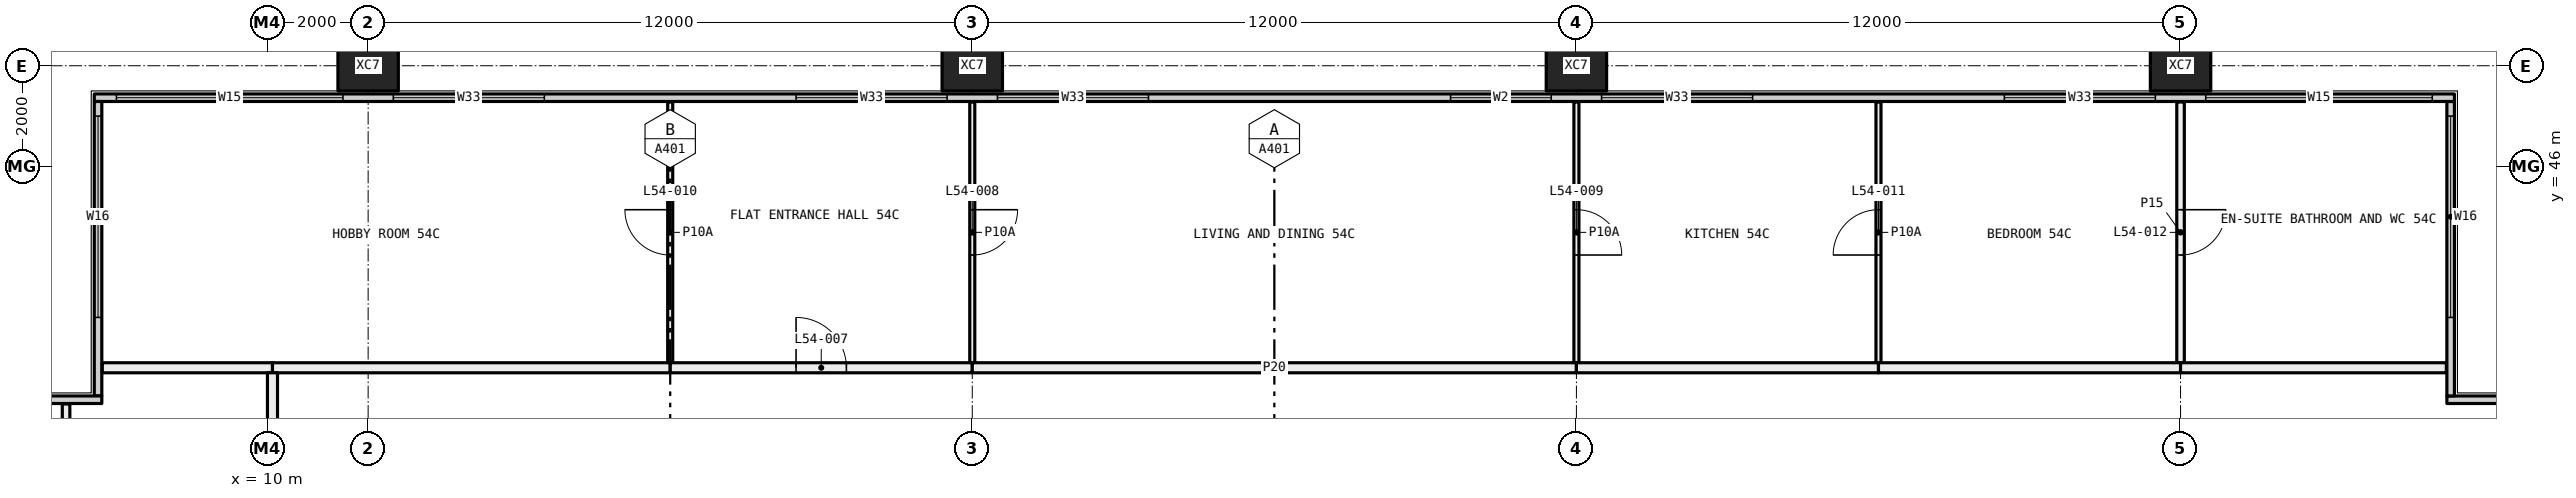
"""IFC4 building model, lengths in metres.
Left out: names, types, materials, properties, quantities, classifications, styles, units other than length and angle.
Written with IfcOpenShell. Run it as: python <this file> out.ifc"""

import sys

from ifc_helpers import new_model, si_unit, direction, frame, frame_2d, origin, origin_2d, place, context, subcontext, project, spatial, rectangle, hollow_rectangle, extrude, element, fill, save


model = new_model("IFC4")
c1 = context("Model", 3, precision=1e-05, world=origin(), true_north=direction((0.0, 1.0)))
c2 = subcontext(c1, "Body", "Model", "MODEL_VIEW")
j1 = project(units=[si_unit("LENGTHUNIT", "METRE"), si_unit("PLANEANGLEUNIT", "RADIAN")], contexts=[c1])
p1 = place(None, origin())
s1 = spatial("IfcSite", under=j1, at=p1, CompositionType="ELEMENT")
p2 = place(p1, origin())
s2 = spatial("IfcBuilding", under=s1, at=p2, CompositionType="ELEMENT")
p3 = place(p2, frame((0.0, 0.0, 203.1)))
s3 = spatial("IfcBuildingStorey", under=s2, at=p3, CompositionType="ELEMENT", Elevation=203.1)
for number, where, z_axis, x_axis in (
    (1, (12.0, 48.0, -0.4), (0.0, 0.0, 1.0), (1.0, 0.0, 0.0)),
    (2, (24.0, 48.0, -0.4), (0.0, 0.0, 1.0), (1.0, 0.0, 0.0)),
    (3, (36.0, 48.0, -0.4), (0.0, 0.0, 1.0), (1.0, 0.0, 0.0)),
    (4, (48.0, 48.0, -0.4), (0.0, 0.0, 1.0), (1.0, 0.0, 0.0)),
):
    element("IfcColumn", number, at=place(p3, frame(where, z_axis=z_axis, x_axis=x_axis)), inside=s3, PredefinedType="COLUMN", context=c2, shape_type="SweptSolid", body=[
        extrude(hollow_rectangle(XDim=1.2, YDim=1.0, WallThickness=0.045, at=origin_2d()), origin(), (0.0, 0.0, 1.0), 3.45),
    ])
p4 = place(p3, frame((53.29, 41.365, 0.0), z_axis=(0.0, 0.0, 1.0), x_axis=(1.0, 0.0, 0.0)))
e5 = element("IfcWall", 5, at=p4, inside=s3, PredefinedType="ELEMENTEDWALL", context=c2, shape_type="SweptSolid", body=[
    extrude(rectangle(XDim=6.15, YDim=0.15, at=frame_2d((3.075, 0.0))), origin(), (0.0, 0.0, 1.0), 3.05),
])
p5 = place(p4, frame((1.71, 0.0, 0.45)))
e6 = element("IfcOpeningElement", 6, at=p5, cuts=e5, PredefinedType="OPENING", context=c2, shape_type="SweptSolid", body=[
    extrude(rectangle(XDim=4.0, YDim=2.55, at=frame_2d((2.0, 1.275))), frame((0.0, 0.085, 0.0), z_axis=(0.0, -1.0, 0.0), x_axis=(1.0, 0.0, 0.0)), (0.0, 0.0, 1.0), 0.17),
])
p6 = place(p3, frame((53.365, 41.44, 0.0), z_axis=(0.0, 0.0, 1.0), x_axis=(0.0, 1.0, 0.0)))
e7 = element("IfcWall", 7, at=p6, inside=s3, PredefinedType="ELEMENTEDWALL", context=c2, shape_type="SweptSolid", body=[
    extrude(rectangle(XDim=5.85, YDim=0.15, at=frame_2d((2.925, 0.0))), origin(), (0.0, 0.0, 1.0), 3.05),
])
p7 = place(p6, frame((1.56, 0.0, 0.45)))
e8 = element("IfcOpeningElement", 8, at=p7, cuts=e7, PredefinedType="OPENING", context=c2, shape_type="SweptSolid", body=[
    extrude(rectangle(XDim=4.0, YDim=2.55, at=frame_2d((2.0, 1.275))), frame((0.0, 0.085, 0.0), z_axis=(0.0, -1.0, 0.0), x_axis=(1.0, 0.0, 0.0)), (0.0, 0.0, 1.0), 0.17),
])
p8 = place(p3, frame((6.56, 47.365, 0.0), z_axis=(0.0, 0.0, 1.0), x_axis=(1.0, 0.0, 0.0)))
e9 = element("IfcWall", 9, at=p8, inside=s3, PredefinedType="ELEMENTEDWALL", context=c2, shape_type="SweptSolid", body=[
    extrude(rectangle(XDim=46.88, YDim=0.15, at=frame_2d((23.44, 0.0))), origin(), (0.0, 0.0, 1.0), 3.05),
])
p9 = place(p8, frame((0.44, 0.0, 0.45)))
e10 = element("IfcOpeningElement", 10, at=p9, cuts=e9, PredefinedType="OPENING", context=c2, shape_type="SweptSolid", body=[
    extrude(rectangle(XDim=4.5, YDim=2.55, at=frame_2d((2.25, 1.275))), frame((0.0, 0.085, 0.0), z_axis=(0.0, -1.0, 0.0), x_axis=(1.0, 0.0, 0.0)), (0.0, 0.0, 1.0), 0.17),
])
p10 = place(p8, frame((5.94, 0.0, 0.45)))
e11 = element("IfcOpeningElement", 11, at=p10, cuts=e9, PredefinedType="OPENING", context=c2, shape_type="SweptSolid", body=[
    extrude(rectangle(XDim=3.0, YDim=2.55, at=frame_2d((1.5, 1.275))), frame((0.0, 0.085, 0.0), z_axis=(0.0, -1.0, 0.0), x_axis=(1.0, 0.0, 0.0)), (0.0, 0.0, 1.0), 0.17),
])
p11 = place(p8, frame((13.94, 0.0, 0.45)))
e12 = element("IfcOpeningElement", 12, at=p11, cuts=e9, PredefinedType="OPENING", context=c2, shape_type="SweptSolid", body=[
    extrude(rectangle(XDim=3.0, YDim=2.55, at=frame_2d((1.5, 1.275))), frame((0.0, 0.085, 0.0), z_axis=(0.0, -1.0, 0.0), x_axis=(1.0, 0.0, 0.0)), (0.0, 0.0, 1.0), 0.17),
])
p12 = place(p8, frame((17.94, 0.0, 0.45)))
e13 = element("IfcOpeningElement", 13, at=p12, cuts=e9, PredefinedType="OPENING", context=c2, shape_type="SweptSolid", body=[
    extrude(rectangle(XDim=3.0, YDim=2.55, at=frame_2d((1.5, 1.275))), frame((0.0, 0.085, 0.0), z_axis=(0.0, -1.0, 0.0), x_axis=(1.0, 0.0, 0.0)), (0.0, 0.0, 1.0), 0.17),
])
p13 = place(p8, frame((26.94, 0.0, 0.45)))
e14 = element("IfcOpeningElement", 14, at=p13, cuts=e9, PredefinedType="OPENING", context=c2, shape_type="SweptSolid", body=[
    extrude(rectangle(XDim=2.0, YDim=2.55, at=frame_2d((1.0, 1.275))), frame((0.0, 0.085, 0.0), z_axis=(0.0, -1.0, 0.0), x_axis=(1.0, 0.0, 0.0)), (0.0, 0.0, 1.0), 0.17),
])
p14 = place(p8, frame((29.94, 0.0, 0.45)))
e15 = element("IfcOpeningElement", 15, at=p14, cuts=e9, PredefinedType="OPENING", context=c2, shape_type="SweptSolid", body=[
    extrude(rectangle(XDim=3.0, YDim=2.55, at=frame_2d((1.5, 1.275))), frame((0.0, 0.085, 0.0), z_axis=(0.0, -1.0, 0.0), x_axis=(1.0, 0.0, 0.0)), (0.0, 0.0, 1.0), 0.17),
])
p15 = place(p8, frame((37.94, 0.0, 0.45)))
e16 = element("IfcOpeningElement", 16, at=p15, cuts=e9, PredefinedType="OPENING", context=c2, shape_type="SweptSolid", body=[
    extrude(rectangle(XDim=3.0, YDim=2.55, at=frame_2d((1.5, 1.275))), frame((0.0, 0.085, 0.0), z_axis=(0.0, -1.0, 0.0), x_axis=(1.0, 0.0, 0.0)), (0.0, 0.0, 1.0), 0.17),
])
p16 = place(p8, frame((41.94, 0.0, 0.45)))
e17 = element("IfcOpeningElement", 17, at=p16, cuts=e9, PredefinedType="OPENING", context=c2, shape_type="SweptSolid", body=[
    extrude(rectangle(XDim=4.5, YDim=2.55, at=frame_2d((2.25, 1.275))), frame((0.0, 0.085, 0.0), z_axis=(0.0, -1.0, 0.0), x_axis=(1.0, 0.0, 0.0)), (0.0, 0.0, 1.0), 0.17),
])
p17 = place(p3, frame((6.635, 41.44, 0.0), z_axis=(0.0, 0.0, 1.0), x_axis=(0.0, 1.0, 0.0)))
e18 = element("IfcWall", 18, at=p17, inside=s3, PredefinedType="ELEMENTEDWALL", context=c2, shape_type="SweptSolid", body=[
    extrude(rectangle(XDim=5.85, YDim=0.15, at=frame_2d((2.925, 0.0))), origin(), (0.0, 0.0, 1.0), 3.05),
])
p18 = place(p17, frame((1.56, 0.0, 0.45)))
e19 = element("IfcOpeningElement", 19, at=p18, cuts=e18, PredefinedType="OPENING", context=c2, shape_type="SweptSolid", body=[
    extrude(rectangle(XDim=4.0, YDim=2.55, at=frame_2d((2.0, 1.275))), frame((0.0, 0.085, 0.0), z_axis=(0.0, -1.0, 0.0), x_axis=(1.0, 0.0, 0.0)), (0.0, 0.0, 1.0), 0.17),
])
p19 = place(p3, frame((0.56, 41.365, 0.0), z_axis=(0.0, 0.0, 1.0), x_axis=(1.0, 0.0, 0.0)))
e20 = element("IfcWall", 20, at=p19, inside=s3, PredefinedType="ELEMENTEDWALL", context=c2, shape_type="SweptSolid", body=[
    extrude(rectangle(XDim=6.15, YDim=0.15, at=frame_2d((3.075, 0.0))), origin(), (0.0, 0.0, 1.0), 3.05),
])
p20 = place(p19, frame((0.44, 0.0, 0.45)))
e21 = element("IfcOpeningElement", 21, at=p20, cuts=e20, PredefinedType="OPENING", context=c2, shape_type="SweptSolid", body=[
    extrude(rectangle(XDim=4.0, YDim=2.55, at=frame_2d((2.0, 1.275))), frame((0.0, 0.085, 0.0), z_axis=(0.0, -1.0, 0.0), x_axis=(1.0, 0.0, 0.0)), (0.0, 0.0, 1.0), 0.17),
])
p21 = place(p3, frame((18.0, 42.1, 0.0), z_axis=(0.0, 0.0, 1.0), x_axis=(0.0, 1.0, 0.0)))
e22 = element("IfcWall", 22, at=p21, inside=s3, PredefinedType="PARTITIONING", context=c2, shape_type="SweptSolid", body=[
    extrude(rectangle(XDim=5.18, YDim=0.1, at=frame_2d((2.59, 0.0))), origin(), (0.0, 0.0, 1.0), 3.05),
])
p22 = place(p21, frame((2.14, 0.0, 0.0)))
e23 = element("IfcOpeningElement", 23, at=p22, cuts=e22, PredefinedType="OPENING", context=c2, shape_type="SweptSolid", body=[
    extrude(rectangle(XDim=0.9, YDim=2.1, at=frame_2d((0.45, 1.05))), frame((0.0, 0.06, 0.0), z_axis=(0.0, -1.0, 0.0), x_axis=(1.0, 0.0, 0.0)), (0.0, 0.0, 1.0), 0.12),
])
p23 = place(p3, frame((6.72, 42.0, 0.0), z_axis=(0.0, 0.0, 1.0), x_axis=(1.0, 0.0, 0.0)))
e24 = element("IfcWall", 24, at=p23, inside=s3, PredefinedType="PARTITIONING", context=c2, shape_type="SweptSolid", body=[
    extrude(rectangle(XDim=3.38, YDim=0.2, at=frame_2d((1.69, 0.0))), origin(), (0.0, 0.0, 1.0), 3.05),
])
p24 = place(p3, frame((10.1, 42.0, 0.0), z_axis=(0.0, 0.0, 1.0), x_axis=(1.0, 0.0, 0.0)))
e25 = element("IfcWall", 25, at=p24, inside=s3, PredefinedType="PARTITIONING", context=c2, shape_type="SweptSolid", body=[
    extrude(rectangle(XDim=7.9, YDim=0.2, at=frame_2d((3.95, 0.0))), origin(), (0.0, 0.0, 1.0), 3.05),
])
p25 = place(p3, frame((24.0, 42.1, 0.0), z_axis=(0.0, 0.0, 1.0), x_axis=(0.0, 1.0, 0.0)))
e26 = element("IfcWall", 26, at=p25, inside=s3, PredefinedType="PARTITIONING", context=c2, shape_type="SweptSolid", body=[
    extrude(rectangle(XDim=5.18, YDim=0.1, at=frame_2d((2.59, 0.0))), origin(), (0.0, 0.0, 1.0), 3.05),
])
p26 = place(p25, frame((2.14, 0.0, 0.0)))
e27 = element("IfcOpeningElement", 27, at=p26, cuts=e26, PredefinedType="OPENING", context=c2, shape_type="SweptSolid", body=[
    extrude(rectangle(XDim=0.9, YDim=2.1, at=frame_2d((0.45, 1.05))), frame((0.0, 0.06, 0.0), z_axis=(0.0, -1.0, 0.0), x_axis=(1.0, 0.0, 0.0)), (0.0, 0.0, 1.0), 0.12),
])
p27 = place(p3, frame((18.0, 42.0, 0.0), z_axis=(0.0, 0.0, 1.0), x_axis=(1.0, 0.0, 0.0)))
e28 = element("IfcWall", 28, at=p27, inside=s3, PredefinedType="PARTITIONING", context=c2, shape_type="SweptSolid", body=[
    extrude(rectangle(XDim=6.0, YDim=0.2, at=frame_2d((3.0, 0.0))), origin(), (0.0, 0.0, 1.0), 3.05),
])
p28 = place(p27, frame((2.5, 0.0, 0.0)))
e29 = element("IfcOpeningElement", 29, at=p28, cuts=e28, PredefinedType="OPENING", context=c2, shape_type="SweptSolid", body=[
    extrude(rectangle(XDim=1.0, YDim=2.1, at=frame_2d((0.5, 1.05))), frame((0.0, 0.11, 0.0), z_axis=(0.0, -1.0, 0.0), x_axis=(1.0, 0.0, 0.0)), (0.0, 0.0, 1.0), 0.22),
])
p29 = place(p3, frame((36.0, 42.1, 0.0), z_axis=(0.0, 0.0, 1.0), x_axis=(0.0, 1.0, 0.0)))
e30 = element("IfcWall", 30, at=p29, inside=s3, PredefinedType="PARTITIONING", context=c2, shape_type="SweptSolid", body=[
    extrude(rectangle(XDim=5.18, YDim=0.1, at=frame_2d((2.59, 0.0))), origin(), (0.0, 0.0, 1.0), 2.45),
])
p30 = place(p29, frame((2.14, 0.0, 0.0)))
e31 = element("IfcOpeningElement", 31, at=p30, cuts=e30, PredefinedType="OPENING", context=c2, shape_type="SweptSolid", body=[
    extrude(rectangle(XDim=0.9, YDim=2.1, at=frame_2d((0.45, 1.05))), frame((0.0, 0.06, 0.0), z_axis=(0.0, -1.0, 0.0), x_axis=(1.0, 0.0, 0.0)), (0.0, 0.0, 1.0), 0.12),
])
p31 = place(p3, frame((24.0, 42.0, 0.0), z_axis=(0.0, 0.0, 1.0), x_axis=(1.0, 0.0, 0.0)))
e32 = element("IfcWall", 32, at=p31, inside=s3, PredefinedType="PARTITIONING", context=c2, shape_type="SweptSolid", body=[
    extrude(rectangle(XDim=12.0, YDim=0.2, at=frame_2d((6.0, 0.0))), origin(), (0.0, 0.0, 1.0), 2.45),
])
p32 = place(p3, frame((42.0, 42.1, 0.0), z_axis=(0.0, 0.0, 1.0), x_axis=(0.0, 1.0, 0.0)))
e33 = element("IfcWall", 33, at=p32, inside=s3, PredefinedType="PARTITIONING", context=c2, shape_type="SweptSolid", body=[
    extrude(rectangle(XDim=5.18, YDim=0.1, at=frame_2d((2.59, 0.0))), origin(), (0.0, 0.0, 1.0), 3.05),
])
p33 = place(p32, frame((2.14, 0.0, 0.0)))
e34 = element("IfcOpeningElement", 34, at=p33, cuts=e33, PredefinedType="OPENING", context=c2, shape_type="SweptSolid", body=[
    extrude(rectangle(XDim=0.9, YDim=2.1, at=frame_2d((0.45, 1.05))), frame((0.0, 0.06, 0.0), z_axis=(0.0, -1.0, 0.0), x_axis=(1.0, 0.0, 0.0)), (0.0, 0.0, 1.0), 0.12),
])
p34 = place(p3, frame((36.0, 42.0, 0.0), z_axis=(0.0, 0.0, 1.0), x_axis=(1.0, 0.0, 0.0)))
e35 = element("IfcWall", 35, at=p34, inside=s3, PredefinedType="PARTITIONING", context=c2, shape_type="SweptSolid", body=[
    extrude(rectangle(XDim=6.0, YDim=0.2, at=frame_2d((3.0, 0.0))), origin(), (0.0, 0.0, 1.0), 2.45),
])
p35 = place(p3, frame((48.0, 42.1, 0.0), z_axis=(0.0, 0.0, 1.0), x_axis=(0.0, 1.0, 0.0)))
e36 = element("IfcWall", 36, at=p35, inside=s3, PredefinedType="PARTITIONING", context=c2, shape_type="SweptSolid", body=[
    extrude(rectangle(XDim=5.18, YDim=0.15, at=frame_2d((2.59, 0.0))), origin(), (0.0, 0.0, 1.0), 3.05),
])
p36 = place(p35, frame((2.14, 0.0, 0.0)))
e37 = element("IfcOpeningElement", 37, at=p36, cuts=e36, PredefinedType="OPENING", context=c2, shape_type="SweptSolid", body=[
    extrude(rectangle(XDim=0.9, YDim=2.1, at=frame_2d((0.45, 1.05))), frame((0.0, 0.085, 0.0), z_axis=(0.0, -1.0, 0.0), x_axis=(1.0, 0.0, 0.0)), (0.0, 0.0, 1.0), 0.17),
])
p37 = place(p3, frame((42.0, 42.0, 0.0), z_axis=(0.0, 0.0, 1.0), x_axis=(1.0, 0.0, 0.0)))
e38 = element("IfcWall", 38, at=p37, inside=s3, PredefinedType="PARTITIONING", context=c2, shape_type="SweptSolid", body=[
    extrude(rectangle(XDim=6.0, YDim=0.2, at=frame_2d((3.0, 0.0))), origin(), (0.0, 0.0, 1.0), 3.05),
])
p38 = place(p3, frame((48.0, 42.0, 0.0), z_axis=(0.0, 0.0, 1.0), x_axis=(1.0, 0.0, 0.0)))
e39 = element("IfcWall", 39, at=p38, inside=s3, PredefinedType="PARTITIONING", context=c2, shape_type="SweptSolid", body=[
    extrude(rectangle(XDim=5.28, YDim=0.2, at=frame_2d((2.64, 0.0))), origin(), (0.0, 0.0, 1.0), 3.05),
])
p39 = place(p3, frame((6.0, 37.5, 0.0), z_axis=(0.0, 0.0, 1.0), x_axis=(0.0, 1.0, 0.0)))
e40 = element("IfcWall", 40, at=p39, inside=s3, PredefinedType="PARTITIONING", context=c2, shape_type="SweptSolid", body=[
    extrude(rectangle(XDim=3.78, YDim=0.15, at=frame_2d((1.89, 0.0))), origin(), (0.0, 0.0, 1.0), 3.05),
])
p40 = place(p3, frame((10.1, 37.5, 0.0), z_axis=(0.0, 0.0, 1.0), x_axis=(0.0, 1.0, 0.0)))
e41 = element("IfcWall", 41, at=p40, inside=s3, PredefinedType="PARTITIONING", context=c2, shape_type="SweptSolid", body=[
    extrude(rectangle(XDim=4.4, YDim=0.2, at=frame_2d((2.2, 0.0))), origin(), (0.0, 0.0, 1.0), 3.05),
])
p41 = place(p7, origin())
e42 = element("IfcWindow", 42, at=p41, inside=s3, PartitioningType="SINGLE_PANEL", PredefinedType="WINDOW", context=c2, shape_type="SweptSolid", body=[
    extrude(rectangle(XDim=4.0, YDim=2.55, at=frame_2d((2.0, 1.275))), frame((0.0, 0.03, 0.0), z_axis=(0.0, -1.0, 0.0), x_axis=(1.0, 0.0, 0.0)), (0.0, 0.0, 1.0), 0.06),
])
fill(e8, e42)
p42 = place(p9, origin())
e43 = element("IfcWindow", 43, at=p42, inside=s3, PartitioningType="SINGLE_PANEL", PredefinedType="WINDOW", context=c2, shape_type="SweptSolid", body=[
    extrude(rectangle(XDim=4.5, YDim=2.55, at=frame_2d((2.25, 1.275))), frame((0.0, 0.03, 0.0), z_axis=(0.0, -1.0, 0.0), x_axis=(1.0, 0.0, 0.0)), (0.0, 0.0, 1.0), 0.06),
])
fill(e10, e43)
p43 = place(p10, origin())
e44 = element("IfcWindow", 44, at=p43, inside=s3, PartitioningType="SINGLE_PANEL", PredefinedType="WINDOW", context=c2, shape_type="SweptSolid", body=[
    extrude(rectangle(XDim=3.0, YDim=2.55, at=frame_2d((1.5, 1.275))), frame((0.0, 0.03, 0.0), z_axis=(0.0, -1.0, 0.0), x_axis=(1.0, 0.0, 0.0)), (0.0, 0.0, 1.0), 0.06),
])
fill(e11, e44)
p44 = place(p11, origin())
e45 = element("IfcWindow", 45, at=p44, inside=s3, PartitioningType="SINGLE_PANEL", PredefinedType="WINDOW", context=c2, shape_type="SweptSolid", body=[
    extrude(rectangle(XDim=3.0, YDim=2.55, at=frame_2d((1.5, 1.275))), frame((0.0, 0.03, 0.0), z_axis=(0.0, -1.0, 0.0), x_axis=(1.0, 0.0, 0.0)), (0.0, 0.0, 1.0), 0.06),
])
fill(e12, e45)
p45 = place(p12, origin())
e46 = element("IfcWindow", 46, at=p45, inside=s3, PartitioningType="SINGLE_PANEL", PredefinedType="WINDOW", context=c2, shape_type="SweptSolid", body=[
    extrude(rectangle(XDim=3.0, YDim=2.55, at=frame_2d((1.5, 1.275))), frame((0.0, 0.03, 0.0), z_axis=(0.0, -1.0, 0.0), x_axis=(1.0, 0.0, 0.0)), (0.0, 0.0, 1.0), 0.06),
])
fill(e13, e46)
p46 = place(p13, origin())
e47 = element("IfcWindow", 47, at=p46, inside=s3, PartitioningType="SINGLE_PANEL", PredefinedType="WINDOW", context=c2, shape_type="SweptSolid", body=[
    extrude(rectangle(XDim=2.0, YDim=2.55, at=frame_2d((1.0, 1.275))), frame((0.0, 0.03, 0.0), z_axis=(0.0, -1.0, 0.0), x_axis=(1.0, 0.0, 0.0)), (0.0, 0.0, 1.0), 0.06),
])
fill(e14, e47)
p47 = place(p14, origin())
e48 = element("IfcWindow", 48, at=p47, inside=s3, PartitioningType="SINGLE_PANEL", PredefinedType="WINDOW", context=c2, shape_type="SweptSolid", body=[
    extrude(rectangle(XDim=3.0, YDim=2.55, at=frame_2d((1.5, 1.275))), frame((0.0, 0.03, 0.0), z_axis=(0.0, -1.0, 0.0), x_axis=(1.0, 0.0, 0.0)), (0.0, 0.0, 1.0), 0.06),
])
fill(e15, e48)
p48 = place(p15, origin())
e49 = element("IfcWindow", 49, at=p48, inside=s3, PartitioningType="SINGLE_PANEL", PredefinedType="WINDOW", context=c2, shape_type="SweptSolid", body=[
    extrude(rectangle(XDim=3.0, YDim=2.55, at=frame_2d((1.5, 1.275))), frame((0.0, 0.03, 0.0), z_axis=(0.0, -1.0, 0.0), x_axis=(1.0, 0.0, 0.0)), (0.0, 0.0, 1.0), 0.06),
])
fill(e16, e49)
p49 = place(p16, origin())
e50 = element("IfcWindow", 50, at=p49, inside=s3, PartitioningType="SINGLE_PANEL", PredefinedType="WINDOW", context=c2, shape_type="SweptSolid", body=[
    extrude(rectangle(XDim=4.5, YDim=2.55, at=frame_2d((2.25, 1.275))), frame((0.0, 0.03, 0.0), z_axis=(0.0, -1.0, 0.0), x_axis=(1.0, 0.0, 0.0)), (0.0, 0.0, 1.0), 0.06),
])
fill(e17, e50)
p50 = place(p18, origin())
e51 = element("IfcWindow", 51, at=p50, inside=s3, PartitioningType="SINGLE_PANEL", PredefinedType="WINDOW", context=c2, shape_type="SweptSolid", body=[
    extrude(rectangle(XDim=4.0, YDim=2.55, at=frame_2d((2.0, 1.275))), frame((0.0, 0.03, 0.0), z_axis=(0.0, -1.0, 0.0), x_axis=(1.0, 0.0, 0.0)), (0.0, 0.0, 1.0), 0.06),
])
fill(e19, e51)
p51 = place(p28, origin())
e52 = element("IfcDoor", 52, at=p51, inside=s3, OperationType="SINGLE_SWING_RIGHT", PredefinedType="DOOR", context=c2, shape_type="SweptSolid", body=[
    extrude(rectangle(XDim=1.0, YDim=2.1, at=frame_2d((0.5, 1.05))), frame((0.0, 0.025, 0.0), z_axis=(0.0, -1.0, 0.0), x_axis=(1.0, 0.0, 0.0)), (0.0, 0.0, 1.0), 0.05),
])
fill(e29, e52)
p52 = place(p26, frame((0.9, 0.0, 0.0), x_axis=(-1.0, 0.0, 0.0)))
e53 = element("IfcDoor", 53, at=p52, inside=s3, OperationType="SINGLE_SWING_RIGHT", PredefinedType="DOOR", context=c2, shape_type="SweptSolid", body=[
    extrude(rectangle(XDim=0.9, YDim=2.1, at=frame_2d((0.45, 1.05))), frame((0.0, 0.025, 0.0), z_axis=(0.0, -1.0, 0.0), x_axis=(1.0, 0.0, 0.0)), (0.0, 0.0, 1.0), 0.05),
])
fill(e27, e53)
p53 = place(p30, frame((0.9, 0.0, 0.0), x_axis=(-1.0, 0.0, 0.0)))
e54 = element("IfcDoor", 54, at=p53, inside=s3, OperationType="SINGLE_SWING_LEFT", PredefinedType="DOOR", context=c2, shape_type="SweptSolid", body=[
    extrude(rectangle(XDim=0.9, YDim=2.1, at=frame_2d((0.45, 1.05))), frame((0.0, 0.025, 0.0), z_axis=(0.0, -1.0, 0.0), x_axis=(1.0, 0.0, 0.0)), (0.0, 0.0, 1.0), 0.05),
])
fill(e31, e54)
p54 = place(p22, origin())
e55 = element("IfcDoor", 55, at=p54, inside=s3, OperationType="SINGLE_SWING_LEFT", PredefinedType="DOOR", context=c2, shape_type="SweptSolid", body=[
    extrude(rectangle(XDim=0.9, YDim=2.1, at=frame_2d((0.45, 1.05))), frame((0.0, 0.025, 0.0), z_axis=(0.0, -1.0, 0.0), x_axis=(1.0, 0.0, 0.0)), (0.0, 0.0, 1.0), 0.05),
])
fill(e23, e55)
p55 = place(p33, origin())
e56 = element("IfcDoor", 56, at=p55, inside=s3, OperationType="SINGLE_SWING_RIGHT", PredefinedType="DOOR", context=c2, shape_type="SweptSolid", body=[
    extrude(rectangle(XDim=0.9, YDim=2.1, at=frame_2d((0.45, 1.05))), frame((0.0, 0.025, 0.0), z_axis=(0.0, -1.0, 0.0), x_axis=(1.0, 0.0, 0.0)), (0.0, 0.0, 1.0), 0.05),
])
fill(e34, e56)
p56 = place(p36, frame((0.9, 0.0, 0.0), x_axis=(-1.0, 0.0, 0.0)))
e57 = element("IfcDoor", 57, at=p56, inside=s3, OperationType="SINGLE_SWING_RIGHT", PredefinedType="DOOR", context=c2, shape_type="SweptSolid", body=[
    extrude(rectangle(XDim=0.9, YDim=2.1, at=frame_2d((0.45, 1.05))), frame((0.0, 0.025, 0.0), z_axis=(0.0, -1.0, 0.0), x_axis=(1.0, 0.0, 0.0)), (0.0, 0.0, 1.0), 0.05),
])
fill(e37, e57)
save(model, sys.argv[1])
